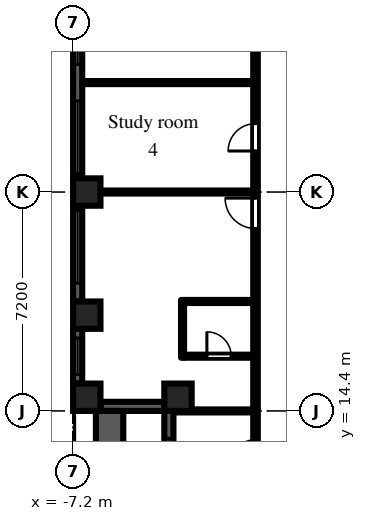
"""IFC4 building model, lengths in metres.
Left out: names, types, materials, properties, quantities, classifications, styles, units other than length and angle.
Written with IfcOpenShell. Run it as: python <this file> out.ifc"""

import sys

from ifc_helpers import new_model, si_unit, direction, frame, frame_2d, origin, origin_2d, place, context, subcontext, project, spatial, rectangle, extrude, element, fill, save


model = new_model("IFC4")
c1 = context("Model", 3, precision=1e-05, world=origin(), true_north=direction((0.0, 1.0)))
c2 = subcontext(c1, "Body", "Model", "MODEL_VIEW")
j1 = project(units=[si_unit("LENGTHUNIT", "METRE"), si_unit("PLANEANGLEUNIT", "RADIAN")], contexts=[c1])
p1 = place(None, origin())
s1 = spatial("IfcSite", under=j1, at=p1, CompositionType="ELEMENT")
p2 = place(p1, origin())
s2 = spatial("IfcBuilding", under=s1, at=p2, CompositionType="ELEMENT")
p3 = place(p2, frame((0.0, 0.0, 53.7)))
s3 = spatial("IfcBuildingStorey", under=s2, at=p3, CompositionType="ELEMENT", Elevation=53.7)
for number, where, z_axis, x_axis in (
    (1, (-6.75, 14.85, 0.0), (0.0, 0.0, 1.0), (1.0, 0.0, 0.0)),
    (2, (-6.75, 17.55, 0.0), (0.0, 0.0, 1.0), (1.0, 0.0, 0.0)),
    (3, (-6.75, 21.6, 0.0), (0.0, 0.0, 1.0), (1.0, 0.0, 0.0)),
    (4, (-3.75, 14.85, 0.0), (0.0, 0.0, 1.0), (1.0, 0.0, 0.0)),
):
    element("IfcColumn", number, at=place(p3, frame(where, z_axis=z_axis, x_axis=x_axis)), inside=s3, PredefinedType="COLUMN", context=c2, shape_type="SweptSolid", body=[
        extrude(rectangle(XDim=0.9, YDim=0.9, at=origin_2d()), origin(), (0.0, 0.0, 1.0), 3.0),
    ])
p4 = place(p3, frame((-7.05, 28.35, 0.0), z_axis=(0.0, 0.0, 1.0), x_axis=(0.0, -1.0, 0.0)))
e5 = element("IfcWall", 5, at=p4, inside=s3, PredefinedType="SOLIDWALL", context=c2, shape_type="SweptSolid", body=[
    extrude(rectangle(XDim=6.3, YDim=0.3, at=frame_2d((3.15, 0.0))), origin(), (0.0, 0.0, 1.0), 2.1),
])
p5 = place(p4, frame((0.15, 0.0, 0.2)))
e6 = element("IfcOpeningElement", 6, at=p5, cuts=e5, PredefinedType="OPENING", context=c2, shape_type="SweptSolid", body=[
    extrude(rectangle(XDim=2.4, YDim=1.85, at=frame_2d((1.2, 0.925))), frame((0.0, 0.16, 0.0), z_axis=(0.0, -1.0, 0.0), x_axis=(1.0, 0.0, 0.0)), (0.0, 0.0, 1.0), 0.32),
])
p6 = place(p4, frame((3.75, 0.0, 0.2)))
e7 = element("IfcOpeningElement", 7, at=p6, cuts=e5, PredefinedType="OPENING", context=c2, shape_type="SweptSolid", body=[
    extrude(rectangle(XDim=2.4, YDim=1.85, at=frame_2d((1.2, 0.925))), frame((0.0, 0.16, 0.0), z_axis=(0.0, -1.0, 0.0), x_axis=(1.0, 0.0, 0.0)), (0.0, 0.0, 1.0), 0.32),
])
p7 = place(p3, frame((-7.05, 21.15, 0.0), z_axis=(0.0, 0.0, 1.0), x_axis=(0.0, -1.0, 0.0)))
e8 = element("IfcWall", 8, at=p7, inside=s3, PredefinedType="SOLIDWALL", context=c2, shape_type="SweptSolid", body=[
    extrude(rectangle(XDim=3.15, YDim=0.3, at=frame_2d((1.575, 0.0))), origin(), (0.0, 0.0, 1.0), 2.1),
])
p8 = place(p7, frame((0.15, 0.0, 0.2)))
e9 = element("IfcOpeningElement", 9, at=p8, cuts=e8, PredefinedType="OPENING", context=c2, shape_type="SweptSolid", body=[
    extrude(rectangle(XDim=2.4, YDim=1.85, at=frame_2d((1.2, 0.925))), frame((0.0, 0.16, 0.0), z_axis=(0.0, -1.0, 0.0), x_axis=(1.0, 0.0, 0.0)), (0.0, 0.0, 1.0), 0.32),
])
p9 = place(p3, frame((-7.05, 17.1, 0.0), z_axis=(0.0, 0.0, 1.0), x_axis=(0.0, -1.0, 0.0)))
e10 = element("IfcWall", 10, at=p9, inside=s3, PredefinedType="SOLIDWALL", context=c2, shape_type="SweptSolid", body=[
    extrude(rectangle(XDim=1.8, YDim=0.3, at=frame_2d((0.9, 0.0))), origin(), (0.0, 0.0, 1.0), 2.1),
])
p10 = place(p9, frame((0.3, 0.0, 0.2)))
e11 = element("IfcOpeningElement", 11, at=p10, cuts=e10, PredefinedType="OPENING", context=c2, shape_type="SweptSolid", body=[
    extrude(rectangle(XDim=1.2, YDim=1.85, at=frame_2d((0.6, 0.925))), frame((0.0, 0.16, 0.0), z_axis=(0.0, -1.0, 0.0), x_axis=(1.0, 0.0, 0.0)), (0.0, 0.0, 1.0), 0.32),
])
p11 = place(p3, frame((-6.3, 14.55, 0.0), z_axis=(0.0, 0.0, 1.0), x_axis=(1.0, 0.0, 0.0)))
e12 = element("IfcWall", 12, at=p11, inside=s3, PredefinedType="SOLIDWALL", context=c2, shape_type="SweptSolid", body=[
    extrude(rectangle(XDim=2.1, YDim=0.3, at=frame_2d((1.05, 0.0))), origin(), (0.0, 0.0, 1.0), 2.1),
])
p12 = place(p3, frame((-4.05, 14.4, 0.0), z_axis=(0.0, 0.0, 1.0), x_axis=(0.0, -1.0, 0.0)))
e13 = element("IfcWall", 13, at=p12, inside=s3, PredefinedType="SOLIDWALL", context=c2, shape_type="SweptSolid", body=[
    extrude(rectangle(XDim=7.2, YDim=0.3, at=frame_2d((3.6, 0.0))), origin(), (0.0, 0.0, 1.0), 2.1),
])
p13 = place(p12, frame((3.0, 0.0, 0.0)))
e14 = element("IfcOpeningElement", 14, at=p13, cuts=e13, PredefinedType="OPENING", context=c2, shape_type="SweptSolid", body=[
    extrude(rectangle(XDim=1.2, YDim=2.05, at=frame_2d((0.6, 1.025))), frame((0.0, 0.16, 0.0), z_axis=(0.0, -1.0, 0.0), x_axis=(1.0, 0.0, 0.0)), (0.0, 0.0, 1.0), 0.32),
])
p14 = place(p12, frame((0.9, 0.0, 0.2)))
e15 = element("IfcOpeningElement", 15, at=p14, cuts=e13, PredefinedType="OPENING", context=c2, shape_type="SweptSolid", body=[
    extrude(rectangle(XDim=1.8, YDim=1.85, at=frame_2d((0.9, 0.925))), frame((0.0, 0.16, 0.0), z_axis=(0.0, -1.0, 0.0), x_axis=(1.0, 0.0, 0.0)), (0.0, 0.0, 1.0), 0.32),
])
p15 = place(p12, frame((4.5, 0.0, 0.2)))
e16 = element("IfcOpeningElement", 16, at=p15, cuts=e13, PredefinedType="OPENING", context=c2, shape_type="SweptSolid", body=[
    extrude(rectangle(XDim=1.8, YDim=1.85, at=frame_2d((0.9, 0.925))), frame((0.0, 0.16, 0.0), z_axis=(0.0, -1.0, 0.0), x_axis=(1.0, 0.0, 0.0)), (0.0, 0.0, 1.0), 0.32),
])
p16 = place(p3, frame((-6.0, 7.2, 0.0), z_axis=(0.0, 0.0, 1.0), x_axis=(0.0, 1.0, 0.0)))
e17 = element("IfcWall", 17, at=p16, inside=s3, PredefinedType="PARAPET", context=c2, shape_type="SweptSolid", body=[
    extrude(rectangle(XDim=7.2, YDim=0.9, at=frame_2d((3.6, 0.0))), origin(), (0.0, 0.0, 1.0), 0.8),
])
for number, where, z_axis, x_axis in (
    (18, (-6.9, 21.6, 0.0), (0.0, 0.0, 1.0), (1.0, 0.0, 0.0)),
    (19, (-6.9, 25.2, 0.0), (0.0, 0.0, 1.0), (1.0, 0.0, 0.0)),
):
    element("IfcWall", number, at=place(p3, frame(where, z_axis=z_axis, x_axis=x_axis)), inside=s3, PredefinedType="PARTITIONING", context=c2, shape_type="SweptSolid", body=[
        extrude(rectangle(XDim=5.625, YDim=0.1, at=frame_2d((2.812, 0.0))), origin(), (0.0, 0.0, 1.0), 2.575),
    ])
p17 = place(p3, frame((-3.9, 14.4, 0.0), z_axis=(0.0, 0.0, 1.0), x_axis=(1.0, 0.0, 0.0)))
e20 = element("IfcWall", 20, at=p17, inside=s3, PredefinedType="PARTITIONING", context=c2, shape_type="SweptSolid", body=[
    extrude(rectangle(XDim=2.625, YDim=0.1, at=frame_2d((1.312, 0.0))), origin(), (0.0, 0.0, 1.0), 2.575),
])
p18 = place(p3, frame((-3.6, 16.15, 0.0), z_axis=(0.0, 0.0, 1.0), x_axis=(0.0, 1.0, 0.0)))
e21 = element("IfcWall", 21, at=p18, inside=s3, PredefinedType="PARTITIONING", context=c2, shape_type="SweptSolid", body=[
    extrude(rectangle(XDim=1.9, YDim=0.1, at=frame_2d((0.95, 0.0))), origin(), (0.0, 0.0, 1.0), 2.575),
])
p19 = place(p3, frame((-3.55, 16.2, 0.0), z_axis=(0.0, 0.0, 1.0), x_axis=(1.0, 0.0, 0.0)))
e22 = element("IfcWall", 22, at=p19, inside=s3, PredefinedType="PARTITIONING", context=c2, shape_type="SweptSolid", body=[
    extrude(rectangle(XDim=2.275, YDim=0.1, at=frame_2d((1.138, 0.0))), origin(), (0.0, 0.0, 1.0), 2.575),
])
p20 = place(p19, frame((0.75, 0.0, 0.0)))
e23 = element("IfcOpeningElement", 23, at=p20, cuts=e22, PredefinedType="OPENING", context=c2, shape_type="SweptSolid", body=[
    extrude(rectangle(XDim=0.8, YDim=2.1, at=frame_2d((0.4, 1.05))), frame((0.0, 0.06, 0.0), z_axis=(0.0, -1.0, 0.0), x_axis=(1.0, 0.0, 0.0)), (0.0, 0.0, 1.0), 0.12),
])
p21 = place(p3, frame((-3.55, 18.0, 0.0), z_axis=(0.0, 0.0, 1.0), x_axis=(1.0, 0.0, 0.0)))
e24 = element("IfcWall", 24, at=p21, inside=s3, PredefinedType="PARTITIONING", context=c2, shape_type="SweptSolid", body=[
    extrude(rectangle(XDim=2.275, YDim=0.1, at=frame_2d((1.138, 0.0))), origin(), (0.0, 0.0, 1.0), 2.575),
])
p22 = place(p3, frame((-1.2, 1.275, 0.0), z_axis=(0.0, 0.0, 1.0), x_axis=(0.0, 1.0, 0.0)))
e25 = element("IfcWall", 25, at=p22, inside=s3, PredefinedType="PARTITIONING", context=c2, shape_type="SweptSolid", body=[
    extrude(rectangle(XDim=35.225, YDim=0.15, at=frame_2d((17.613, 0.0))), origin(), (0.0, 0.0, 1.0), 2.575),
])
p23 = place(p22, frame((2.475, 0.0, 0.0)))
e26 = element("IfcOpeningElement", 26, at=p23, cuts=e25, PredefinedType="OPENING", context=c2, shape_type="SweptSolid", body=[
    extrude(rectangle(XDim=0.9, YDim=2.1, at=frame_2d((0.45, 1.05))), frame((0.0, 0.085, 0.0), z_axis=(0.0, -1.0, 0.0), x_axis=(1.0, 0.0, 0.0)), (0.0, 0.0, 1.0), 0.17),
])
p24 = place(p22, frame((11.275, 0.0, 0.0)))
e27 = element("IfcOpeningElement", 27, at=p24, cuts=e25, PredefinedType="OPENING", context=c2, shape_type="SweptSolid", body=[
    extrude(rectangle(XDim=0.9, YDim=2.1, at=frame_2d((0.45, 1.05))), frame((0.0, 0.085, 0.0), z_axis=(0.0, -1.0, 0.0), x_axis=(1.0, 0.0, 0.0)), (0.0, 0.0, 1.0), 0.17),
])
p25 = place(p22, frame((7.675, 0.0, 0.0)))
e28 = element("IfcOpeningElement", 28, at=p25, cuts=e25, PredefinedType="OPENING", context=c2, shape_type="SweptSolid", body=[
    extrude(rectangle(XDim=0.9, YDim=2.1, at=frame_2d((0.45, 1.05))), frame((0.0, 0.085, 0.0), z_axis=(0.0, -1.0, 0.0), x_axis=(1.0, 0.0, 0.0)), (0.0, 0.0, 1.0), 0.17),
])
p26 = place(p22, frame((19.125, 0.0, 0.0)))
e29 = element("IfcOpeningElement", 29, at=p26, cuts=e25, PredefinedType="OPENING", context=c2, shape_type="SweptSolid", body=[
    extrude(rectangle(XDim=1.0, YDim=2.1, at=frame_2d((0.5, 1.05))), frame((0.0, 0.085, 0.0), z_axis=(0.0, -1.0, 0.0), x_axis=(1.0, 0.0, 0.0)), (0.0, 0.0, 1.0), 0.17),
])
p27 = place(p22, frame((21.675, 0.0, 0.0)))
e30 = element("IfcOpeningElement", 30, at=p27, cuts=e25, PredefinedType="OPENING", context=c2, shape_type="SweptSolid", body=[
    extrude(rectangle(XDim=0.9, YDim=2.1, at=frame_2d((0.45, 1.05))), frame((0.0, 0.085, 0.0), z_axis=(0.0, -1.0, 0.0), x_axis=(1.0, 0.0, 0.0)), (0.0, 0.0, 1.0), 0.17),
])
p28 = place(p22, frame((29.925, 0.0, 0.0)))
e31 = element("IfcOpeningElement", 31, at=p28, cuts=e25, PredefinedType="OPENING", context=c2, shape_type="SweptSolid", body=[
    extrude(rectangle(XDim=1.0, YDim=2.1, at=frame_2d((0.5, 1.05))), frame((0.0, 0.085, 0.0), z_axis=(0.0, -1.0, 0.0), x_axis=(1.0, 0.0, 0.0)), (0.0, 0.0, 1.0), 0.17),
])
p29 = place(p22, frame((32.275, 0.0, 0.0)))
e32 = element("IfcOpeningElement", 32, at=p29, cuts=e25, PredefinedType="OPENING", context=c2, shape_type="SweptSolid", body=[
    extrude(rectangle(XDim=1.8, YDim=2.1, at=frame_2d((0.9, 1.05))), frame((0.0, 0.085, 0.0), z_axis=(0.0, -1.0, 0.0), x_axis=(1.0, 0.0, 0.0)), (0.0, 0.0, 1.0), 0.17),
])
p30 = place(p5, origin())
e33 = element("IfcWindow", 33, at=p30, inside=s3, PartitioningType="SINGLE_PANEL", PredefinedType="WINDOW", context=c2, shape_type="SweptSolid", body=[
    extrude(rectangle(XDim=2.4, YDim=1.85, at=frame_2d((1.2, 0.925))), frame((0.0, 0.03, 0.0), z_axis=(0.0, -1.0, 0.0), x_axis=(1.0, 0.0, 0.0)), (0.0, 0.0, 1.0), 0.06),
])
fill(e6, e33)
p31 = place(p6, origin())
e34 = element("IfcWindow", 34, at=p31, inside=s3, PartitioningType="SINGLE_PANEL", PredefinedType="WINDOW", context=c2, shape_type="SweptSolid", body=[
    extrude(rectangle(XDim=2.4, YDim=1.85, at=frame_2d((1.2, 0.925))), frame((0.0, 0.03, 0.0), z_axis=(0.0, -1.0, 0.0), x_axis=(1.0, 0.0, 0.0)), (0.0, 0.0, 1.0), 0.06),
])
fill(e7, e34)
p32 = place(p8, origin())
e35 = element("IfcWindow", 35, at=p32, inside=s3, PartitioningType="SINGLE_PANEL", PredefinedType="WINDOW", context=c2, shape_type="SweptSolid", body=[
    extrude(rectangle(XDim=2.4, YDim=1.85, at=frame_2d((1.2, 0.925))), frame((0.0, 0.03, 0.0), z_axis=(0.0, -1.0, 0.0), x_axis=(1.0, 0.0, 0.0)), (0.0, 0.0, 1.0), 0.06),
])
fill(e9, e35)
p33 = place(p10, origin())
e36 = element("IfcWindow", 36, at=p33, inside=s3, PartitioningType="SINGLE_PANEL", PredefinedType="WINDOW", context=c2, shape_type="SweptSolid", body=[
    extrude(rectangle(XDim=1.2, YDim=1.85, at=frame_2d((0.6, 0.925))), frame((0.0, 0.03, 0.0), z_axis=(0.0, -1.0, 0.0), x_axis=(1.0, 0.0, 0.0)), (0.0, 0.0, 1.0), 0.06),
])
fill(e11, e36)
p34 = place(p14, origin())
e37 = element("IfcWindow", 37, at=p34, inside=s3, PartitioningType="SINGLE_PANEL", PredefinedType="WINDOW", context=c2, shape_type="SweptSolid", body=[
    extrude(rectangle(XDim=1.8, YDim=1.85, at=frame_2d((0.9, 0.925))), frame((0.0, 0.03, 0.0), z_axis=(0.0, -1.0, 0.0), x_axis=(1.0, 0.0, 0.0)), (0.0, 0.0, 1.0), 0.06),
])
fill(e15, e37)
p35 = place(p24, origin())
e38 = element("IfcDoor", 38, at=p35, inside=s3, OperationType="SINGLE_SWING_LEFT", PredefinedType="DOOR", context=c2, shape_type="SweptSolid", body=[
    extrude(rectangle(XDim=0.9, YDim=2.1, at=frame_2d((0.45, 1.05))), frame((0.0, 0.025, 0.0), z_axis=(0.0, -1.0, 0.0), x_axis=(1.0, 0.0, 0.0)), (0.0, 0.0, 1.0), 0.05),
])
fill(e27, e38)
p36 = place(p20, origin())
e39 = element("IfcDoor", 39, at=p36, inside=s3, OperationType="SINGLE_SWING_LEFT", PredefinedType="DOOR", context=c2, shape_type="SweptSolid", body=[
    extrude(rectangle(XDim=0.8, YDim=2.1, at=frame_2d((0.4, 1.05))), frame((0.0, 0.025, 0.0), z_axis=(0.0, -1.0, 0.0), x_axis=(1.0, 0.0, 0.0)), (0.0, 0.0, 1.0), 0.05),
])
fill(e23, e39)
p37 = place(p26, origin())
e40 = element("IfcDoor", 40, at=p37, inside=s3, OperationType="SINGLE_SWING_RIGHT", PredefinedType="DOOR", context=c2, shape_type="SweptSolid", body=[
    extrude(rectangle(XDim=1.0, YDim=2.1, at=frame_2d((0.5, 1.05))), frame((0.0, 0.025, 0.0), z_axis=(0.0, -1.0, 0.0), x_axis=(1.0, 0.0, 0.0)), (0.0, 0.0, 1.0), 0.05),
])
fill(e29, e40)
p38 = place(p27, origin())
e41 = element("IfcDoor", 41, at=p38, inside=s3, OperationType="SINGLE_SWING_LEFT", PredefinedType="DOOR", context=c2, shape_type="SweptSolid", body=[
    extrude(rectangle(XDim=0.9, YDim=2.1, at=frame_2d((0.45, 1.05))), frame((0.0, 0.025, 0.0), z_axis=(0.0, -1.0, 0.0), x_axis=(1.0, 0.0, 0.0)), (0.0, 0.0, 1.0), 0.05),
])
fill(e30, e41)
save(model, sys.argv[1])
